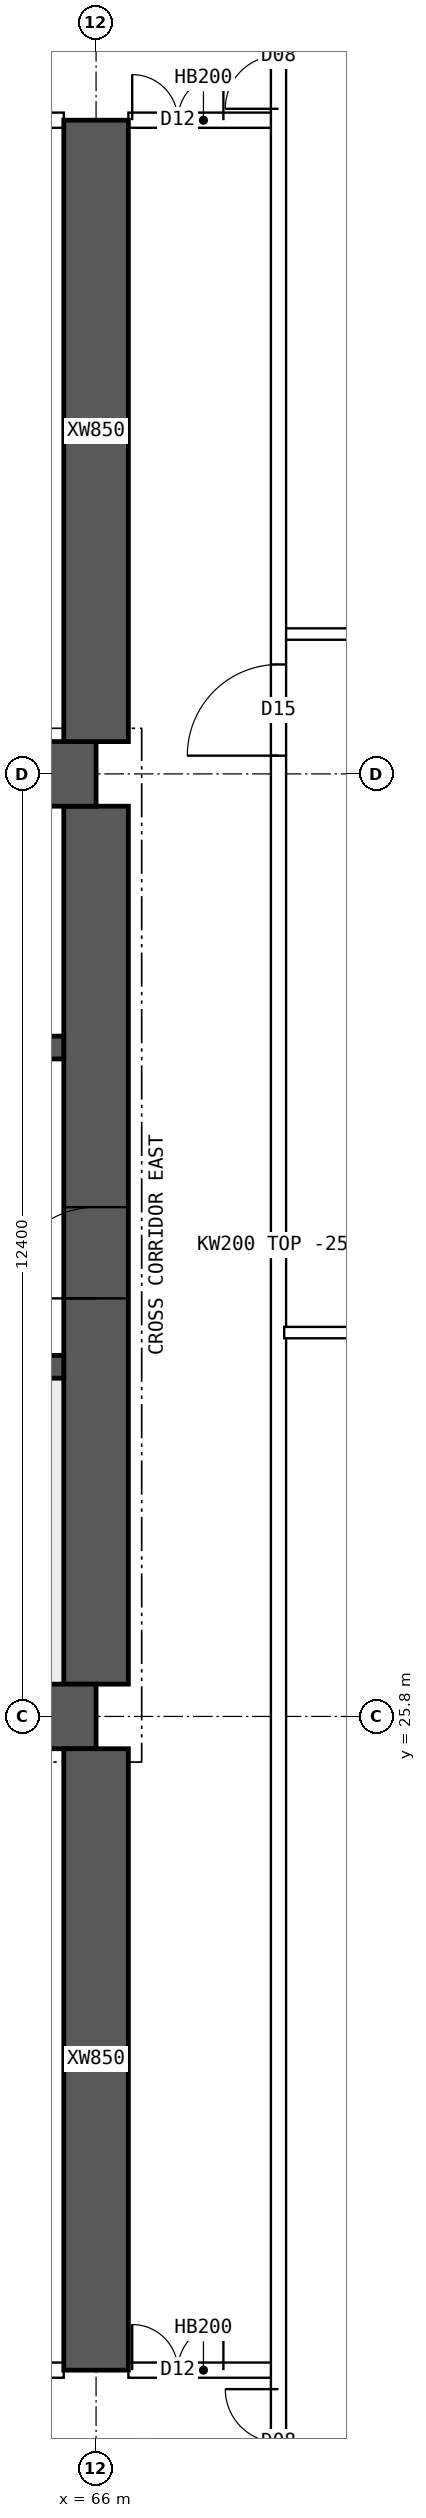
"""IFC4 building model, lengths in metres.
Left out: names, types, materials, properties, quantities, classifications, styles, units other than length and angle.
Written with IfcOpenShell. Run it as: python <this file> out.ifc"""

import sys

from ifc_helpers import new_model, si_unit, direction, frame, frame_2d, origin, place, context, subcontext, project, spatial, polyline, rectangle, outline, extrude, element, fill, save


model = new_model("IFC4")
c1 = context("Model", 3, precision=1e-05, world=origin(), true_north=direction((0.0, 1.0)))
c2 = subcontext(c1, "Body", "Model", "MODEL_VIEW")
j1 = project(units=[si_unit("LENGTHUNIT", "METRE"), si_unit("PLANEANGLEUNIT", "RADIAN")], contexts=[c1])
p1 = place(None, origin())
s1 = spatial("IfcSite", under=j1, at=p1, CompositionType="ELEMENT")
p2 = place(p1, origin())
s2 = spatial("IfcBuilding", under=s1, at=p2, CompositionType="ELEMENT")
p3 = place(p2, frame((0.0, 0.0, 148.6)))
s3 = spatial("IfcBuildingStorey", under=s2, at=p3, CompositionType="ELEMENT", Elevation=148.6)
for number, where, z_axis, x_axis in (
    (1, (18.0, 25.8, 0.0), (0.0, 0.0, 1.0), (1.0, 0.0, 0.0)),
    (2, (18.0, 38.2, 0.0), (0.0, 0.0, 1.0), (1.0, 0.0, 0.0)),
):
    element("IfcWall", number, at=place(p3, frame(where, z_axis=z_axis, x_axis=x_axis)), inside=s3, PredefinedType="SHEAR", context=c2, shape_type="SweptSolid", body=[
        extrude(rectangle(XDim=48.0, YDim=0.85, at=frame_2d((24.0, 0.0))), origin(), (0.0, 0.0, 1.0), 3.75),
    ])
p4 = place(p3, frame((66.0, 26.225, 0.0), z_axis=(0.0, 0.0, 1.0), x_axis=(0.0, 1.0, 0.0)))
e3 = element("IfcWall", 3, at=p4, inside=s3, PredefinedType="SHEAR", context=c2, shape_type="SweptSolid", body=[
    extrude(rectangle(XDim=11.55, YDim=0.85, at=frame_2d((5.775, 0.0))), origin(), (0.0, 0.0, 1.0), 3.75),
])
p5 = place(p4, frame((5.075, 0.0, 0.0)))
e4 = element("IfcOpeningElement", 4, at=p5, cuts=e3, PredefinedType="OPENING", context=c2, shape_type="SweptSolid", body=[
    extrude(rectangle(XDim=1.2, YDim=2.1, at=frame_2d((0.6, 1.05))), frame((0.0, 0.435, 0.0), z_axis=(0.0, -1.0, 0.0), x_axis=(1.0, 0.0, 0.0)), (0.0, 0.0, 1.0), 0.87),
])
p6 = place(p3, frame((18.425, 30.4, 0.0), z_axis=(0.0, 0.0, 1.0), x_axis=(1.0, 0.0, 0.0)))
e5 = element("IfcWall", 5, at=p6, inside=s3, PredefinedType="SHEAR", context=c2, shape_type="SweptSolid", body=[
    extrude(rectangle(XDim=47.15, YDim=0.3, at=frame_2d((23.575, 0.0))), origin(), (0.0, 0.0, 1.0), 3.75),
])
p7 = place(p6, frame((0.4, 0.0, 0.0)))
e6 = element("IfcOpeningElement", 6, at=p7, cuts=e5, PredefinedType="OPENING", context=c2, shape_type="SweptSolid", body=[
    extrude(rectangle(XDim=1.0, YDim=2.1, at=frame_2d((0.5, 1.05))), frame((0.0, 0.16, 0.0), z_axis=(0.0, -1.0, 0.0), x_axis=(1.0, 0.0, 0.0)), (0.0, 0.0, 1.0), 0.32),
])
p8 = place(p6, frame((45.75, 0.0, 0.0)))
e7 = element("IfcOpeningElement", 7, at=p8, cuts=e5, PredefinedType="OPENING", context=c2, shape_type="SweptSolid", body=[
    extrude(rectangle(XDim=1.0, YDim=2.1, at=frame_2d((0.5, 1.05))), frame((0.0, 0.16, 0.0), z_axis=(0.0, -1.0, 0.0), x_axis=(1.0, 0.0, 0.0)), (0.0, 0.0, 1.0), 0.32),
])
p9 = place(p6, frame((8.325, 0.0, 0.0)))
e8 = element("IfcOpeningElement", 8, at=p9, cuts=e5, PredefinedType="OPENING", context=c2, shape_type="SweptSolid", body=[
    extrude(rectangle(XDim=1.1, YDim=2.1, at=frame_2d((0.55, 1.05))), frame((0.0, 0.16, 0.0), z_axis=(0.0, -1.0, 0.0), x_axis=(1.0, 0.0, 0.0)), (0.0, 0.0, 1.0), 0.32),
])
p10 = place(p6, frame((10.925, 0.0, 0.0)))
e9 = element("IfcOpeningElement", 9, at=p10, cuts=e5, PredefinedType="OPENING", context=c2, shape_type="SweptSolid", body=[
    extrude(rectangle(XDim=1.1, YDim=2.1, at=frame_2d((0.55, 1.05))), frame((0.0, 0.16, 0.0), z_axis=(0.0, -1.0, 0.0), x_axis=(1.0, 0.0, 0.0)), (0.0, 0.0, 1.0), 0.32),
])
p11 = place(p6, frame((13.525, 0.0, 0.0)))
e10 = element("IfcOpeningElement", 10, at=p11, cuts=e5, PredefinedType="OPENING", context=c2, shape_type="SweptSolid", body=[
    extrude(rectangle(XDim=1.1, YDim=2.1, at=frame_2d((0.55, 1.05))), frame((0.0, 0.16, 0.0), z_axis=(0.0, -1.0, 0.0), x_axis=(1.0, 0.0, 0.0)), (0.0, 0.0, 1.0), 0.32),
])
p12 = place(p6, frame((16.125, 0.0, 0.0)))
e11 = element("IfcOpeningElement", 11, at=p12, cuts=e5, PredefinedType="OPENING", context=c2, shape_type="SweptSolid", body=[
    extrude(rectangle(XDim=1.1, YDim=2.1, at=frame_2d((0.55, 1.05))), frame((0.0, 0.16, 0.0), z_axis=(0.0, -1.0, 0.0), x_axis=(1.0, 0.0, 0.0)), (0.0, 0.0, 1.0), 0.32),
])
p13 = place(p6, frame((18.9, 0.0, 0.0)))
e12 = element("IfcOpeningElement", 12, at=p13, cuts=e5, PredefinedType="OPENING", context=c2, shape_type="SweptSolid", body=[
    extrude(rectangle(XDim=0.9, YDim=2.1, at=frame_2d((0.45, 1.05))), frame((0.0, 0.16, 0.0), z_axis=(0.0, -1.0, 0.0), x_axis=(1.0, 0.0, 0.0)), (0.0, 0.0, 1.0), 0.32),
])
p14 = place(p6, frame((30.192, 0.0, 0.0)))
e13 = element("IfcOpeningElement", 13, at=p14, cuts=e5, PredefinedType="OPENING", context=c2, shape_type="SweptSolid", body=[
    extrude(rectangle(XDim=1.1, YDim=2.1, at=frame_2d((0.55, 1.05))), frame((0.0, 0.16, 0.0), z_axis=(0.0, -1.0, 0.0), x_axis=(1.0, 0.0, 0.0)), (0.0, 0.0, 1.0), 0.32),
])
p15 = place(p6, frame((33.725, 0.0, 0.0)))
e14 = element("IfcOpeningElement", 14, at=p15, cuts=e5, PredefinedType="OPENING", context=c2, shape_type="SweptSolid", body=[
    extrude(rectangle(XDim=1.1, YDim=2.1, at=frame_2d((0.55, 1.05))), frame((0.0, 0.16, 0.0), z_axis=(0.0, -1.0, 0.0), x_axis=(1.0, 0.0, 0.0)), (0.0, 0.0, 1.0), 0.32),
])
p16 = place(p6, frame((37.258, 0.0, 0.0)))
e15 = element("IfcOpeningElement", 15, at=p16, cuts=e5, PredefinedType="OPENING", context=c2, shape_type="SweptSolid", body=[
    extrude(rectangle(XDim=1.1, YDim=2.1, at=frame_2d((0.55, 1.05))), frame((0.0, 0.16, 0.0), z_axis=(0.0, -1.0, 0.0), x_axis=(1.0, 0.0, 0.0)), (0.0, 0.0, 1.0), 0.32),
])
p17 = place(p3, frame((18.425, 34.6, 0.0), z_axis=(0.0, 0.0, 1.0), x_axis=(1.0, 0.0, 0.0)))
e16 = element("IfcWall", 16, at=p17, inside=s3, PredefinedType="SHEAR", context=c2, shape_type="SweptSolid", body=[
    extrude(rectangle(XDim=47.15, YDim=0.3, at=frame_2d((23.575, 0.0))), origin(), (0.0, 0.0, 1.0), 3.75),
])
p18 = place(p17, frame((0.9, 0.0, 0.0)))
e17 = element("IfcOpeningElement", 17, at=p18, cuts=e16, PredefinedType="OPENING", context=c2, shape_type="SweptSolid", body=[
    extrude(rectangle(XDim=1.1, YDim=2.1, at=frame_2d((0.55, 1.05))), frame((0.0, 0.16, 0.0), z_axis=(0.0, -1.0, 0.0), x_axis=(1.0, 0.0, 0.0)), (0.0, 0.0, 1.0), 0.32),
])
p19 = place(p17, frame((45.15, 0.0, 0.0)))
e18 = element("IfcOpeningElement", 18, at=p19, cuts=e16, PredefinedType="OPENING", context=c2, shape_type="SweptSolid", body=[
    extrude(rectangle(XDim=1.1, YDim=2.1, at=frame_2d((0.55, 1.05))), frame((0.0, 0.16, 0.0), z_axis=(0.0, -1.0, 0.0), x_axis=(1.0, 0.0, 0.0)), (0.0, 0.0, 1.0), 0.32),
])
p20 = place(p17, frame((4.175, 0.0, 0.0)))
e19 = element("IfcOpeningElement", 19, at=p20, cuts=e16, PredefinedType="OPENING", context=c2, shape_type="SweptSolid", body=[
    extrude(rectangle(XDim=0.9, YDim=2.1, at=frame_2d((0.45, 1.05))), frame((0.0, 0.16, 0.0), z_axis=(0.0, -1.0, 0.0), x_axis=(1.0, 0.0, 0.0)), (0.0, 0.0, 1.0), 0.32),
])
p21 = place(p17, frame((42.075, 0.0, 0.0)))
e20 = element("IfcOpeningElement", 20, at=p21, cuts=e16, PredefinedType="OPENING", context=c2, shape_type="SweptSolid", body=[
    extrude(rectangle(XDim=0.9, YDim=2.1, at=frame_2d((0.45, 1.05))), frame((0.0, 0.16, 0.0), z_axis=(0.0, -1.0, 0.0), x_axis=(1.0, 0.0, 0.0)), (0.0, 0.0, 1.0), 0.32),
])
p22 = place(p17, frame((8.95, 0.0, 0.0)))
e21 = element("IfcOpeningElement", 21, at=p22, cuts=e16, PredefinedType="OPENING", context=c2, shape_type="SweptSolid", body=[
    extrude(rectangle(XDim=0.9, YDim=2.1, at=frame_2d((0.45, 1.05))), frame((0.0, 0.16, 0.0), z_axis=(0.0, -1.0, 0.0), x_axis=(1.0, 0.0, 0.0)), (0.0, 0.0, 1.0), 0.32),
])
p23 = place(p17, frame((12.924, 0.0, 0.0)))
e22 = element("IfcOpeningElement", 22, at=p23, cuts=e16, PredefinedType="OPENING", context=c2, shape_type="SweptSolid", body=[
    extrude(rectangle(XDim=0.9, YDim=2.1, at=frame_2d((0.45, 1.05))), frame((0.0, 0.16, 0.0), z_axis=(0.0, -1.0, 0.0), x_axis=(1.0, 0.0, 0.0)), (0.0, 0.0, 1.0), 0.32),
])
p24 = place(p17, frame((16.571, 0.0, 0.0)))
e23 = element("IfcOpeningElement", 23, at=p24, cuts=e16, PredefinedType="OPENING", context=c2, shape_type="SweptSolid", body=[
    extrude(rectangle(XDim=0.9, YDim=2.1, at=frame_2d((0.45, 1.05))), frame((0.0, 0.16, 0.0), z_axis=(0.0, -1.0, 0.0), x_axis=(1.0, 0.0, 0.0)), (0.0, 0.0, 1.0), 0.32),
])
p25 = place(p17, frame((20.33, 0.0, 0.0)))
e24 = element("IfcOpeningElement", 24, at=p25, cuts=e16, PredefinedType="OPENING", context=c2, shape_type="SweptSolid", body=[
    extrude(rectangle(XDim=0.9, YDim=2.1, at=frame_2d((0.45, 1.05))), frame((0.0, 0.16, 0.0), z_axis=(0.0, -1.0, 0.0), x_axis=(1.0, 0.0, 0.0)), (0.0, 0.0, 1.0), 0.32),
])
p26 = place(p17, frame((24.736, 0.0, 0.0)))
e25 = element("IfcOpeningElement", 25, at=p26, cuts=e16, PredefinedType="OPENING", context=c2, shape_type="SweptSolid", body=[
    extrude(rectangle(XDim=0.9, YDim=2.1, at=frame_2d((0.45, 1.05))), frame((0.0, 0.16, 0.0), z_axis=(0.0, -1.0, 0.0), x_axis=(1.0, 0.0, 0.0)), (0.0, 0.0, 1.0), 0.32),
])
p27 = place(p17, frame((27.533, 0.0, 0.0)))
e26 = element("IfcOpeningElement", 26, at=p27, cuts=e16, PredefinedType="OPENING", context=c2, shape_type="SweptSolid", body=[
    extrude(rectangle(XDim=0.9, YDim=2.1, at=frame_2d((0.45, 1.05))), frame((0.0, 0.16, 0.0), z_axis=(0.0, -1.0, 0.0), x_axis=(1.0, 0.0, 0.0)), (0.0, 0.0, 1.0), 0.32),
])
p28 = place(p17, frame((29.703, 0.0, 0.0)))
e27 = element("IfcOpeningElement", 27, at=p28, cuts=e16, PredefinedType="OPENING", context=c2, shape_type="SweptSolid", body=[
    extrude(rectangle(XDim=0.9, YDim=2.1, at=frame_2d((0.45, 1.05))), frame((0.0, 0.16, 0.0), z_axis=(0.0, -1.0, 0.0), x_axis=(1.0, 0.0, 0.0)), (0.0, 0.0, 1.0), 0.32),
])
p29 = place(p17, frame((33.502, 0.0, 0.0)))
e28 = element("IfcOpeningElement", 28, at=p29, cuts=e16, PredefinedType="OPENING", context=c2, shape_type="SweptSolid", body=[
    extrude(rectangle(XDim=0.9, YDim=2.1, at=frame_2d((0.45, 1.05))), frame((0.0, 0.16, 0.0), z_axis=(0.0, -1.0, 0.0), x_axis=(1.0, 0.0, 0.0)), (0.0, 0.0, 1.0), 0.32),
])
p30 = place(p17, frame((37.453, 0.0, 0.0)))
e29 = element("IfcOpeningElement", 29, at=p30, cuts=e16, PredefinedType="OPENING", context=c2, shape_type="SweptSolid", body=[
    extrude(rectangle(XDim=0.9, YDim=2.1, at=frame_2d((0.45, 1.05))), frame((0.0, 0.16, 0.0), z_axis=(0.0, -1.0, 0.0), x_axis=(1.0, 0.0, 0.0)), (0.0, 0.0, 1.0), 0.32),
])
for number, where, z_axis, x_axis in (
    (30, (66.0, 17.2, 0.0), (0.0, 0.0, 1.0), (0.0, 1.0, 0.0)),
    (31, (66.0, 38.625, 0.0), (0.0, 0.0, 1.0), (0.0, 1.0, 0.0)),
):
    element("IfcWall", number, at=place(p3, frame(where, z_axis=z_axis, x_axis=x_axis)), inside=s3, PredefinedType="SHEAR", context=c2, shape_type="SweptSolid", body=[
        extrude(rectangle(XDim=8.175, YDim=0.85, at=frame_2d((4.087, 0.0))), origin(), (0.0, 0.0, 1.0), 3.75),
    ])
p31 = place(p3, frame((60.425, 17.2, 0.0), z_axis=(0.0, 0.0, 1.0), x_axis=(1.0, 0.0, 0.0)))
e32 = element("IfcWall", 32, at=p31, inside=s3, PredefinedType="SOLIDWALL", context=c2, shape_type="SweptSolid", body=[
    extrude(rectangle(XDim=5.15, YDim=0.2, at=frame_2d((2.575, 0.0))), origin(), (0.0, 0.0, 1.0), 3.5),
])
p32 = place(p31, frame((0.15, 0.0, 0.0)))
e33 = element("IfcOpeningElement", 33, at=p32, cuts=e32, PredefinedType="OPENING", context=c2, shape_type="SweptSolid", body=[
    extrude(rectangle(XDim=0.9, YDim=2.1, at=frame_2d((0.45, 1.05))), frame((0.0, 0.11, 0.0), z_axis=(0.0, -1.0, 0.0), x_axis=(1.0, 0.0, 0.0)), (0.0, 0.0, 1.0), 0.22),
])
p33 = place(p31, frame((2.415, 0.0, 0.0)))
e34 = element("IfcOpeningElement", 34, at=p33, cuts=e32, PredefinedType="OPENING", context=c2, shape_type="SweptSolid", body=[
    extrude(rectangle(XDim=0.9, YDim=2.1, at=frame_2d((0.45, 1.05))), frame((0.0, 0.11, 0.0), z_axis=(0.0, -1.0, 0.0), x_axis=(1.0, 0.0, 0.0)), (0.0, 0.0, 1.0), 0.22),
])
p34 = place(p3, frame((66.425, 17.2, 0.0), z_axis=(0.0, 0.0, 1.0), x_axis=(1.0, 0.0, 0.0)))
e35 = element("IfcWall", 35, at=p34, inside=s3, PredefinedType="SOLIDWALL", context=c2, shape_type="SweptSolid", body=[
    extrude(rectangle(XDim=1.975, YDim=0.2, at=frame_2d((0.987, 0.0))), origin(), (0.0, 0.0, 1.0), 3.5),
])
p35 = place(p34, frame((0.05, 0.0, 0.0)))
e36 = element("IfcOpeningElement", 36, at=p35, cuts=e35, PredefinedType="OPENING", context=c2, shape_type="SweptSolid", body=[
    extrude(rectangle(XDim=1.2, YDim=2.1, at=frame_2d((0.6, 1.05))), frame((0.0, 0.11, 0.0), z_axis=(0.0, -1.0, 0.0), x_axis=(1.0, 0.0, 0.0)), (0.0, 0.0, 1.0), 0.22),
])
p36 = place(p3, frame((60.425, 46.8, 0.0), z_axis=(0.0, 0.0, 1.0), x_axis=(1.0, 0.0, 0.0)))
e37 = element("IfcWall", 37, at=p36, inside=s3, PredefinedType="SOLIDWALL", context=c2, shape_type="SweptSolid", body=[
    extrude(rectangle(XDim=5.15, YDim=0.2, at=frame_2d((2.575, 0.0))), origin(), (0.0, 0.0, 1.0), 3.5),
])
p37 = place(p36, frame((0.45, 0.0, 0.0)))
e38 = element("IfcOpeningElement", 38, at=p37, cuts=e37, PredefinedType="OPENING", context=c2, shape_type="SweptSolid", body=[
    extrude(rectangle(XDim=1.0, YDim=2.1, at=frame_2d((0.5, 1.05))), frame((0.0, 0.11, 0.0), z_axis=(0.0, -1.0, 0.0), x_axis=(1.0, 0.0, 0.0)), (0.0, 0.0, 1.0), 0.22),
])
p38 = place(p3, frame((66.425, 46.8, 0.0), z_axis=(0.0, 0.0, 1.0), x_axis=(1.0, 0.0, 0.0)))
e39 = element("IfcWall", 39, at=p38, inside=s3, PredefinedType="SOLIDWALL", context=c2, shape_type="SweptSolid", body=[
    extrude(rectangle(XDim=1.975, YDim=0.2, at=frame_2d((0.987, 0.0))), origin(), (0.0, 0.0, 1.0), 3.5),
])
p39 = place(p38, frame((0.05, 0.0, 0.0)))
e40 = element("IfcOpeningElement", 40, at=p39, cuts=e39, PredefinedType="OPENING", context=c2, shape_type="SweptSolid", body=[
    extrude(rectangle(XDim=1.2, YDim=2.1, at=frame_2d((0.6, 1.05))), frame((0.0, 0.11, 0.0), z_axis=(0.0, -1.0, 0.0), x_axis=(1.0, 0.0, 0.0)), (0.0, 0.0, 1.0), 0.22),
])
p40 = place(p3, frame((68.475, 30.85, 0.0), z_axis=(0.0, 0.0, 1.0), x_axis=(1.0, 0.0, 0.0)))
e41 = element("IfcWall", 41, at=p40, inside=s3, PredefinedType="PARTITIONING", context=c2, shape_type="SweptSolid", body=[
    extrude(outline(polyline([(0.0, 0.0), (6.82, 0.0), (6.82, 3.5), (3.827, 3.5), (3.825, 3.05), (3.227, 3.05), (3.225, 3.5), (0.0, 3.5), (0.0, 0.0)])), frame((0.0, 0.075, 0.0), z_axis=(0.0, -1.0, 0.0), x_axis=(1.0, 0.0, 0.0)), (0.0, 0.0, 1.0), 0.15),
])
p41 = place(p3, frame((68.4, 10.446, 0.0), z_axis=(0.0, 0.0, 1.0), x_axis=(0.0, 1.0, 0.0)))
e42 = element("IfcWall", 42, at=p41, inside=s3, PredefinedType="SOLIDWALL", context=c2, shape_type="SweptSolid", body=[
    extrude(rectangle(XDim=43.107, YDim=0.2, at=frame_2d((21.554, 0.0))), origin(), (0.0, 0.0, 1.0), 3.5),
])
p42 = place(p41, frame((27.994, 0.0, 0.0)))
e43 = element("IfcOpeningElement", 43, at=p42, cuts=e42, PredefinedType="OPENING", context=c2, shape_type="SweptSolid", body=[
    extrude(rectangle(XDim=1.2, YDim=2.1, at=frame_2d((0.6, 1.05))), frame((0.0, 0.11, 0.0), z_axis=(0.0, -1.0, 0.0), x_axis=(1.0, 0.0, 0.0)), (0.0, 0.0, 1.0), 0.22),
])
p43 = place(p41, frame((5.104, 0.0, 0.0)))
e44 = element("IfcOpeningElement", 44, at=p43, cuts=e42, PredefinedType="OPENING", context=c2, shape_type="SweptSolid", body=[
    extrude(rectangle(XDim=1.4, YDim=2.1, at=frame_2d((0.7, 1.05))), frame((0.0, 0.11, 0.0), z_axis=(0.0, -1.0, 0.0), x_axis=(1.0, 0.0, 0.0)), (0.0, 0.0, 1.0), 0.22),
])
p44 = place(p41, frame((36.504, 0.0, 0.0)))
e45 = element("IfcOpeningElement", 45, at=p44, cuts=e42, PredefinedType="OPENING", context=c2, shape_type="SweptSolid", body=[
    extrude(rectangle(XDim=1.4, YDim=2.1, at=frame_2d((0.7, 1.05))), frame((0.0, 0.11, 0.0), z_axis=(0.0, -1.0, 0.0), x_axis=(1.0, 0.0, 0.0)), (0.0, 0.0, 1.0), 0.22),
])
p45 = place(p3, frame((68.475, 40.04, 0.0), z_axis=(0.0, 0.0, 1.0), x_axis=(1.0, 0.0, 0.0)))
e46 = element("IfcWall", 46, at=p45, inside=s3, PredefinedType="PARTITIONING", context=c2, shape_type="SweptSolid", body=[
    extrude(rectangle(XDim=6.82, YDim=0.15, at=frame_2d((3.41, 0.0))), origin(), (0.0, 0.0, 1.0), 3.5),
])
p46 = place(p5, origin())
e47 = element("IfcDoor", 47, at=p46, inside=s3, OperationType="SINGLE_SWING_LEFT", PredefinedType="DOOR", context=c2, shape_type="SweptSolid", body=[
    extrude(rectangle(XDim=1.2, YDim=2.1, at=frame_2d((0.6, 1.05))), frame((0.0, 0.025, 0.0), z_axis=(0.0, -1.0, 0.0), x_axis=(1.0, 0.0, 0.0)), (0.0, 0.0, 1.0), 0.05),
])
fill(e4, e47)
p47 = place(p35, origin())
e48 = element("IfcDoor", 48, at=p47, inside=s3, OperationType="DOUBLE_DOOR_SINGLE_SWING", PredefinedType="DOOR", context=c2, shape_type="SweptSolid", body=[
    extrude(rectangle(XDim=1.2, YDim=2.1, at=frame_2d((0.6, 1.05))), frame((0.0, 0.025, 0.0), z_axis=(0.0, -1.0, 0.0), x_axis=(1.0, 0.0, 0.0)), (0.0, 0.0, 1.0), 0.05),
])
fill(e36, e48)
p48 = place(p39, origin())
e49 = element("IfcDoor", 49, at=p48, inside=s3, OperationType="DOUBLE_DOOR_SINGLE_SWING", PredefinedType="DOOR", context=c2, shape_type="SweptSolid", body=[
    extrude(rectangle(XDim=1.2, YDim=2.1, at=frame_2d((0.6, 1.05))), frame((0.0, 0.025, 0.0), z_axis=(0.0, -1.0, 0.0), x_axis=(1.0, 0.0, 0.0)), (0.0, 0.0, 1.0), 0.05),
])
fill(e40, e49)
p49 = place(p42, origin())
e50 = element("IfcDoor", 50, at=p49, inside=s3, OperationType="SINGLE_SWING_LEFT", PredefinedType="DOOR", context=c2, shape_type="SweptSolid", body=[
    extrude(rectangle(XDim=1.2, YDim=2.1, at=frame_2d((0.6, 1.05))), frame((0.0, 0.025, 0.0), z_axis=(0.0, -1.0, 0.0), x_axis=(1.0, 0.0, 0.0)), (0.0, 0.0, 1.0), 0.05),
])
fill(e43, e50)
p50 = place(p43, origin())
e51 = element("IfcDoor", 51, at=p50, inside=s3, OperationType="DOUBLE_DOOR_SINGLE_SWING", PredefinedType="DOOR", context=c2, shape_type="SweptSolid", body=[
    extrude(rectangle(XDim=1.4, YDim=2.1, at=frame_2d((0.7, 1.05))), frame((0.0, 0.025, 0.0), z_axis=(0.0, -1.0, 0.0), x_axis=(1.0, 0.0, 0.0)), (0.0, 0.0, 1.0), 0.05),
])
fill(e44, e51)
p51 = place(p44, origin())
e52 = element("IfcDoor", 52, at=p51, inside=s3, OperationType="DOUBLE_DOOR_SINGLE_SWING", PredefinedType="DOOR", context=c2, shape_type="SweptSolid", body=[
    extrude(rectangle(XDim=1.4, YDim=2.1, at=frame_2d((0.7, 1.05))), frame((0.0, 0.025, 0.0), z_axis=(0.0, -1.0, 0.0), x_axis=(1.0, 0.0, 0.0)), (0.0, 0.0, 1.0), 0.05),
])
fill(e45, e52)
save(model, sys.argv[1])
